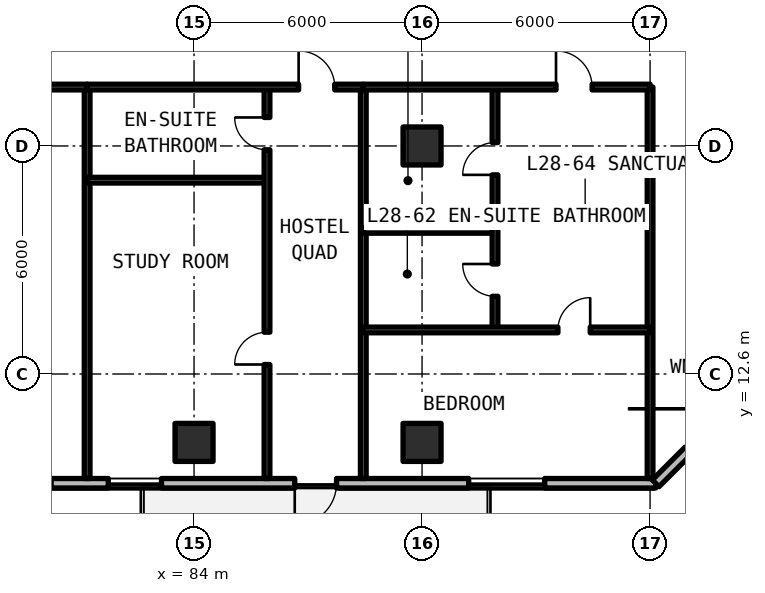
"""IFC4 building model, lengths in metres.
Left out: names, types, materials, properties, quantities, classifications, styles, units other than length and angle.
Written with IfcOpenShell. Run it as: python <this file> out.ifc"""

import sys

from ifc_helpers import new_model, si_unit, direction, frame, frame_2d, origin, origin_2d, place, context, subcontext, project, spatial, rectangle, extrude, element, fill, save


model = new_model("IFC4")
c1 = context("Model", 3, precision=1e-05, world=origin(), true_north=direction((0.0, 1.0)))
c2 = subcontext(c1, "Body", "Model", "MODEL_VIEW")
j1 = project(units=[si_unit("LENGTHUNIT", "METRE"), si_unit("PLANEANGLEUNIT", "RADIAN")], contexts=[c1])
p1 = place(None, origin())
s1 = spatial("IfcSite", under=j1, at=p1, CompositionType="ELEMENT")
p2 = place(p1, origin())
s2 = spatial("IfcBuilding", under=s1, at=p2, CompositionType="ELEMENT")
p3 = place(p2, frame((0.0, 0.0, 101.97)))
s3 = spatial("IfcBuildingStorey", under=s2, at=p3, CompositionType="ELEMENT", Elevation=101.97)
for number, where, z_axis, x_axis in (
    (1, (90.0, 18.6, 0.0), (0.0, 0.0, 1.0), (1.0, 0.0, 0.0)),
    (2, (84.0, 10.8, 0.0), (0.0, 0.0, 1.0), (1.0, 0.0, 0.0)),
    (3, (90.0, 10.8, 0.0), (0.0, 0.0, 1.0), (1.0, 0.0, 0.0)),
):
    element("IfcColumn", number, at=place(p3, frame(where, z_axis=z_axis, x_axis=x_axis)), inside=s3, PredefinedType="COLUMN", context=c2, shape_type="SweptSolid", body=[
        extrude(rectangle(XDim=1.0, YDim=1.0, at=origin_2d()), origin(), (0.0, 0.0, 1.0), 3.3),
    ])
p4 = place(p3, frame((52.125, 9.725, 0.0), z_axis=(0.0, 0.0, 1.0), x_axis=(1.0, 0.0, 0.0)))
e4 = element("IfcWall", 4, at=p4, inside=s3, PredefinedType="SOLIDWALL", context=c2, shape_type="SweptSolid", body=[
    extrude(rectangle(XDim=44.023, YDim=0.25, at=frame_2d((22.012, 0.0))), origin(), (0.0, 0.0, 1.0), 3.08),
])
p5 = place(p4, frame((11.075, 0.0, 0.0)))
e5 = element("IfcOpeningElement", 5, at=p5, cuts=e4, PredefinedType="OPENING", context=c2, shape_type="SweptSolid", body=[
    extrude(rectangle(XDim=1.1, YDim=2.15, at=frame_2d((0.55, 1.075))), frame((0.0, 0.135, 0.0), z_axis=(0.0, -1.0, 0.0), x_axis=(1.0, 0.0, 0.0)), (0.0, 0.0, 1.0), 0.27),
])
p6 = place(p4, frame((22.175, 0.0, 0.0)))
e6 = element("IfcOpeningElement", 6, at=p6, cuts=e4, PredefinedType="OPENING", context=c2, shape_type="SweptSolid", body=[
    extrude(rectangle(XDim=1.1, YDim=2.15, at=frame_2d((0.55, 1.075))), frame((0.0, 0.135, 0.0), z_axis=(0.0, -1.0, 0.0), x_axis=(1.0, 0.0, 0.0)), (0.0, 0.0, 1.0), 0.27),
])
p7 = place(p4, frame((34.525, 0.0, 0.0)))
e7 = element("IfcOpeningElement", 7, at=p7, cuts=e4, PredefinedType="OPENING", context=c2, shape_type="SweptSolid", body=[
    extrude(rectangle(XDim=1.1, YDim=2.15, at=frame_2d((0.55, 1.075))), frame((0.0, 0.135, 0.0), z_axis=(0.0, -1.0, 0.0), x_axis=(1.0, 0.0, 0.0)), (0.0, 0.0, 1.0), 0.27),
])
p8 = place(p4, frame((2.669, 0.0, 0.78)))
e8 = element("IfcOpeningElement", 8, at=p8, cuts=e4, PredefinedType="OPENING", context=c2, shape_type="SweptSolid", body=[
    extrude(rectangle(XDim=2.0, YDim=1.66, at=frame_2d((1.0, 0.83))), frame((0.0, 0.135, 0.0), z_axis=(0.0, -1.0, 0.0), x_axis=(1.0, 0.0, 0.0)), (0.0, 0.0, 1.0), 0.27),
])
p9 = place(p4, frame((8.314, 0.0, 0.78)))
e9 = element("IfcOpeningElement", 9, at=p9, cuts=e4, PredefinedType="OPENING", context=c2, shape_type="SweptSolid", body=[
    extrude(rectangle(XDim=0.85, YDim=1.65, at=frame_2d((0.425, 0.825))), frame((0.0, 0.135, 0.0), z_axis=(0.0, -1.0, 0.0), x_axis=(1.0, 0.0, 0.0)), (0.0, 0.0, 1.0), 0.27),
])
p10 = place(p4, frame((15.009, 0.0, 0.78)))
e10 = element("IfcOpeningElement", 10, at=p10, cuts=e4, PredefinedType="OPENING", context=c2, shape_type="SweptSolid", body=[
    extrude(rectangle(XDim=0.85, YDim=1.65, at=frame_2d((0.425, 0.825))), frame((0.0, 0.135, 0.0), z_axis=(0.0, -1.0, 0.0), x_axis=(1.0, 0.0, 0.0)), (0.0, 0.0, 1.0), 0.27),
])
p11 = place(p4, frame((17.708, 0.0, 0.78)))
e11 = element("IfcOpeningElement", 11, at=p11, cuts=e4, PredefinedType="OPENING", context=c2, shape_type="SweptSolid", body=[
    extrude(rectangle(XDim=1.4, YDim=1.65, at=frame_2d((0.7, 0.825))), frame((0.0, 0.135, 0.0), z_axis=(0.0, -1.0, 0.0), x_axis=(1.0, 0.0, 0.0)), (0.0, 0.0, 1.0), 0.27),
])
p12 = place(p4, frame((26.714, 0.0, 0.78)))
e12 = element("IfcOpeningElement", 12, at=p12, cuts=e4, PredefinedType="OPENING", context=c2, shape_type="SweptSolid", body=[
    extrude(rectangle(XDim=1.4, YDim=1.65, at=frame_2d((0.7, 0.825))), frame((0.0, 0.135, 0.0), z_axis=(0.0, -1.0, 0.0), x_axis=(1.0, 0.0, 0.0)), (0.0, 0.0, 1.0), 0.27),
])
p13 = place(p4, frame((29.618, 0.0, 0.78)))
e13 = element("IfcOpeningElement", 13, at=p13, cuts=e4, PredefinedType="OPENING", context=c2, shape_type="SweptSolid", body=[
    extrude(rectangle(XDim=1.4, YDim=1.65, at=frame_2d((0.7, 0.825))), frame((0.0, 0.135, 0.0), z_axis=(0.0, -1.0, 0.0), x_axis=(1.0, 0.0, 0.0)), (0.0, 0.0, 1.0), 0.27),
])
p14 = place(p4, frame((39.102, 0.0, 0.78)))
e14 = element("IfcOpeningElement", 14, at=p14, cuts=e4, PredefinedType="OPENING", context=c2, shape_type="SweptSolid", body=[
    extrude(rectangle(XDim=2.0, YDim=1.66, at=frame_2d((1.0, 0.83))), frame((0.0, 0.135, 0.0), z_axis=(0.0, -1.0, 0.0), x_axis=(1.0, 0.0, 0.0)), (0.0, 0.0, 1.0), 0.27),
])
p15 = place(p3, frame((96.148, 9.725, 0.0), z_axis=(0.0, 0.0, 1.0), x_axis=(0.707106781187, 0.707106781187, 0.0)))
e15 = element("IfcWall", 15, at=p15, inside=s3, PredefinedType="SOLIDWALL", context=c2, shape_type="SweptSolid", body=[
    extrude(rectangle(XDim=5.836, YDim=0.25, at=frame_2d((2.918, 0.0))), origin(), (0.0, 0.0, 1.0), 3.08),
])
p16 = place(p15, frame((1.218, 0.0, 0.78)))
e16 = element("IfcOpeningElement", 16, at=p16, cuts=e15, PredefinedType="OPENING", context=c2, shape_type="SweptSolid", body=[
    extrude(rectangle(XDim=3.4, YDim=1.66, at=frame_2d((1.7, 0.83))), frame((0.0, 0.135, 0.0), z_axis=(0.0, -1.0, 0.0), x_axis=(1.0, 0.0, 0.0)), (0.0, 0.0, 1.0), 0.27),
])
for number, where, z_axis, x_axis in (
    (17, (96.0, 9.85, 0.0), (0.0, 0.0, 1.0), (0.0, 1.0, 0.0)),
    (18, (81.187, 9.85, 0.0), (0.0, 0.0, 1.0), (0.0, 1.0, 0.0)),
):
    element("IfcWall", number, at=place(p3, frame(where, z_axis=z_axis, x_axis=x_axis)), inside=s3, PredefinedType="SOLIDWALL", context=c2, shape_type="SweptSolid", body=[
        extrude(rectangle(XDim=10.3, YDim=0.15, at=frame_2d((5.15, 0.0))), origin(), (0.0, 0.0, 1.0), 2.35),
    ])
p17 = place(p3, frame((73.641, 20.15, 0.0), z_axis=(0.0, 0.0, 1.0), x_axis=(1.0, 0.0, 0.0)))
e19 = element("IfcWall", 19, at=p17, inside=s3, PredefinedType="SOLIDWALL", context=c2, shape_type="SweptSolid", body=[
    extrude(rectangle(XDim=7.546, YDim=0.15, at=frame_2d((3.773, 0.0))), origin(), (0.0, 0.0, 1.0), 2.35),
])
p18 = place(p17, frame((4.513, 0.0, 0.0)))
e20 = element("IfcOpeningElement", 20, at=p18, cuts=e19, PredefinedType="OPENING", context=c2, shape_type="SweptSolid", body=[
    extrude(rectangle(XDim=0.95, YDim=2.15, at=frame_2d((0.475, 1.075))), frame((0.0, 0.085, 0.0), z_axis=(0.0, -1.0, 0.0), x_axis=(1.0, 0.0, 0.0)), (0.0, 0.0, 1.0), 0.17),
])
p19 = place(p3, frame((88.454, 9.85, 0.0), z_axis=(0.0, 0.0, 1.0), x_axis=(0.0, 1.0, 0.0)))
e21 = element("IfcWall", 21, at=p19, inside=s3, PredefinedType="SOLIDWALL", context=c2, shape_type="SweptSolid", body=[
    extrude(rectangle(XDim=10.3, YDim=0.15, at=frame_2d((5.15, 0.0))), origin(), (0.0, 0.0, 1.0), 2.35),
])
p20 = place(p3, frame((81.187, 17.7, 0.0), z_axis=(0.0, 0.0, 1.0), x_axis=(1.0, 0.0, 0.0)))
e22 = element("IfcWall", 22, at=p20, inside=s3, PredefinedType="PARTITIONING", context=c2, shape_type="SweptSolid", body=[
    extrude(rectangle(XDim=4.733, YDim=0.15, at=frame_2d((2.366, 0.0))), origin(), (0.0, 0.0, 1.0), 2.35),
])
p21 = place(p3, frame((85.92, 9.85, 0.0), z_axis=(0.0, 0.0, 1.0), x_axis=(0.0, 1.0, 0.0)))
e23 = element("IfcWall", 23, at=p21, inside=s3, PredefinedType="PARTITIONING", context=c2, shape_type="SweptSolid", body=[
    extrude(rectangle(XDim=10.3, YDim=0.15, at=frame_2d((5.15, 0.0))), origin(), (0.0, 0.0, 1.0), 2.35),
])
p22 = place(p21, frame((3.0, 0.0, 0.0)))
e24 = element("IfcOpeningElement", 24, at=p22, cuts=e23, PredefinedType="OPENING", context=c2, shape_type="SweptSolid", body=[
    extrude(rectangle(XDim=0.85, YDim=2.1, at=frame_2d((0.425, 1.05))), frame((0.0, 0.085, 0.0), z_axis=(0.0, -1.0, 0.0), x_axis=(1.0, 0.0, 0.0)), (0.0, 0.0, 1.0), 0.17),
])
p23 = place(p21, frame((8.65, 0.0, 0.0)))
e25 = element("IfcOpeningElement", 25, at=p23, cuts=e23, PredefinedType="OPENING", context=c2, shape_type="SweptSolid", body=[
    extrude(rectangle(XDim=0.85, YDim=2.1, at=frame_2d((0.425, 1.05))), frame((0.0, 0.085, 0.0), z_axis=(0.0, -1.0, 0.0), x_axis=(1.0, 0.0, 0.0)), (0.0, 0.0, 1.0), 0.17),
])
p24 = place(p3, frame((81.187, 20.15, 0.0), z_axis=(0.0, 0.0, 1.0), x_axis=(1.0, 0.0, 0.0)))
e26 = element("IfcWall", 26, at=p24, inside=s3, PredefinedType="SOLIDWALL", context=c2, shape_type="SweptSolid", body=[
    extrude(rectangle(XDim=7.267, YDim=0.15, at=frame_2d((3.633, 0.0))), origin(), (0.0, 0.0, 1.0), 2.35),
])
p25 = place(p24, frame((5.565, 0.0, 0.0)))
e27 = element("IfcOpeningElement", 27, at=p25, cuts=e26, PredefinedType="OPENING", context=c2, shape_type="SweptSolid", body=[
    extrude(rectangle(XDim=0.95, YDim=2.15, at=frame_2d((0.475, 1.075))), frame((0.0, 0.085, 0.0), z_axis=(0.0, -1.0, 0.0), x_axis=(1.0, 0.0, 0.0)), (0.0, 0.0, 1.0), 0.17),
])
p26 = place(p3, frame((88.454, 16.379, 0.0), z_axis=(0.0, 0.0, 1.0), x_axis=(1.0, 0.0, 0.0)))
e28 = element("IfcWall", 28, at=p26, inside=s3, PredefinedType="PARTITIONING", context=c2, shape_type="SweptSolid", body=[
    extrude(rectangle(XDim=3.466, YDim=0.15, at=frame_2d((1.733, 0.0))), origin(), (0.0, 0.0, 1.0), 2.35),
])
p27 = place(p3, frame((91.92, 13.759, 0.0), z_axis=(0.0, 0.0, 1.0), x_axis=(0.0, 1.0, 0.0)))
e29 = element("IfcWall", 29, at=p27, inside=s3, PredefinedType="PARTITIONING", context=c2, shape_type="SweptSolid", body=[
    extrude(rectangle(XDim=6.391, YDim=0.15, at=frame_2d((3.195, 0.0))), origin(), (0.0, 0.0, 1.0), 2.35),
])
p28 = place(p27, frame((0.885, 0.0, 0.0)))
e30 = element("IfcOpeningElement", 30, at=p28, cuts=e29, PredefinedType="OPENING", context=c2, shape_type="SweptSolid", body=[
    extrude(rectangle(XDim=0.85, YDim=2.1, at=frame_2d((0.425, 1.05))), frame((0.0, 0.085, 0.0), z_axis=(0.0, -1.0, 0.0), x_axis=(1.0, 0.0, 0.0)), (0.0, 0.0, 1.0), 0.17),
])
p29 = place(p27, frame((4.08, 0.0, 0.0)))
e31 = element("IfcOpeningElement", 31, at=p29, cuts=e29, PredefinedType="OPENING", context=c2, shape_type="SweptSolid", body=[
    extrude(rectangle(XDim=0.85, YDim=2.1, at=frame_2d((0.425, 1.05))), frame((0.0, 0.085, 0.0), z_axis=(0.0, -1.0, 0.0), x_axis=(1.0, 0.0, 0.0)), (0.0, 0.0, 1.0), 0.17),
])
p30 = place(p3, frame((88.454, 13.759, 0.0), z_axis=(0.0, 0.0, 1.0), x_axis=(1.0, 0.0, 0.0)))
e32 = element("IfcWall", 32, at=p30, inside=s3, PredefinedType="PARTITIONING", context=c2, shape_type="SweptSolid", body=[
    extrude(rectangle(XDim=7.546, YDim=0.15, at=frame_2d((3.773, 0.0))), origin(), (0.0, 0.0, 1.0), 2.35),
])
p31 = place(p30, frame((5.121, 0.0, 0.0)))
e33 = element("IfcOpeningElement", 33, at=p31, cuts=e32, PredefinedType="OPENING", context=c2, shape_type="SweptSolid", body=[
    extrude(rectangle(XDim=0.85, YDim=2.1, at=frame_2d((0.425, 1.05))), frame((0.0, 0.085, 0.0), z_axis=(0.0, -1.0, 0.0), x_axis=(1.0, 0.0, 0.0)), (0.0, 0.0, 1.0), 0.17),
])
p32 = place(p3, frame((88.454, 20.15, 0.0), z_axis=(0.0, 0.0, 1.0), x_axis=(1.0, 0.0, 0.0)))
e34 = element("IfcWall", 34, at=p32, inside=s3, PredefinedType="SOLIDWALL", context=c2, shape_type="SweptSolid", body=[
    extrude(rectangle(XDim=7.546, YDim=0.15, at=frame_2d((3.773, 0.0))), origin(), (0.0, 0.0, 1.0), 2.35),
])
p33 = place(p32, frame((5.071, 0.0, 0.0)))
e35 = element("IfcOpeningElement", 35, at=p33, cuts=e34, PredefinedType="OPENING", context=c2, shape_type="SweptSolid", body=[
    extrude(rectangle(XDim=0.95, YDim=2.15, at=frame_2d((0.475, 1.075))), frame((0.0, 0.085, 0.0), z_axis=(0.0, -1.0, 0.0), x_axis=(1.0, 0.0, 0.0)), (0.0, 0.0, 1.0), 0.17),
])
p34 = place(p7, frame((1.1, 0.0, 0.0), z_axis=(0.0, 0.0, 1.0), x_axis=(-1.0, 0.0, 0.0)))
e36 = element("IfcDoor", 36, at=p34, inside=s3, OperationType="SINGLE_SWING_LEFT", PredefinedType="DOOR", context=c2, shape_type="SweptSolid", body=[
    extrude(rectangle(XDim=1.1, YDim=2.15, at=frame_2d((0.55, 1.075))), frame((0.0, 0.025, 0.0), z_axis=(0.0, -1.0, 0.0), x_axis=(1.0, 0.0, 0.0)), (0.0, 0.0, 1.0), 0.05),
])
fill(e7, e36)
p35 = place(p13, origin())
e37 = element("IfcWindow", 37, at=p35, inside=s3, PartitioningType="SINGLE_PANEL", PredefinedType="WINDOW", context=c2, shape_type="SweptSolid", body=[
    extrude(rectangle(XDim=1.4, YDim=1.65, at=frame_2d((0.7, 0.825))), frame((0.0, 0.03, 0.0), z_axis=(0.0, -1.0, 0.0), x_axis=(1.0, 0.0, 0.0)), (0.0, 0.0, 1.0), 0.06),
])
fill(e13, e37)
p36 = place(p14, origin())
e38 = element("IfcWindow", 38, at=p36, inside=s3, PartitioningType="SINGLE_PANEL", PredefinedType="WINDOW", context=c2, shape_type="SweptSolid", body=[
    extrude(rectangle(XDim=2.0, YDim=1.66, at=frame_2d((1.0, 0.83))), frame((0.0, 0.03, 0.0), z_axis=(0.0, -1.0, 0.0), x_axis=(1.0, 0.0, 0.0)), (0.0, 0.0, 1.0), 0.06),
])
fill(e14, e38)
p37 = place(p22, origin())
e39 = element("IfcDoor", 39, at=p37, inside=s3, OperationType="SINGLE_SWING_LEFT", PredefinedType="DOOR", context=c2, shape_type="SweptSolid", body=[
    extrude(rectangle(XDim=0.85, YDim=2.1, at=frame_2d((0.425, 1.05))), frame((0.0, 0.025, 0.0), z_axis=(0.0, -1.0, 0.0), x_axis=(1.0, 0.0, 0.0)), (0.0, 0.0, 1.0), 0.05),
])
fill(e24, e39)
p38 = place(p23, origin())
e40 = element("IfcDoor", 40, at=p38, inside=s3, OperationType="SINGLE_SWING_RIGHT", PredefinedType="DOOR", context=c2, shape_type="SweptSolid", body=[
    extrude(rectangle(XDim=0.85, YDim=2.1, at=frame_2d((0.425, 1.05))), frame((0.0, 0.025, 0.0), z_axis=(0.0, -1.0, 0.0), x_axis=(1.0, 0.0, 0.0)), (0.0, 0.0, 1.0), 0.05),
])
fill(e25, e40)
p39 = place(p25, origin())
e41 = element("IfcDoor", 41, at=p39, inside=s3, OperationType="SINGLE_SWING_LEFT", PredefinedType="DOOR", context=c2, shape_type="SweptSolid", body=[
    extrude(rectangle(XDim=0.95, YDim=2.15, at=frame_2d((0.475, 1.075))), frame((0.0, 0.025, 0.0), z_axis=(0.0, -1.0, 0.0), x_axis=(1.0, 0.0, 0.0)), (0.0, 0.0, 1.0), 0.05),
])
fill(e27, e41)
p40 = place(p28, origin())
e42 = element("IfcDoor", 42, at=p40, inside=s3, OperationType="SINGLE_SWING_RIGHT", PredefinedType="DOOR", context=c2, shape_type="SweptSolid", body=[
    extrude(rectangle(XDim=0.85, YDim=2.1, at=frame_2d((0.425, 1.05))), frame((0.0, 0.025, 0.0), z_axis=(0.0, -1.0, 0.0), x_axis=(1.0, 0.0, 0.0)), (0.0, 0.0, 1.0), 0.05),
])
fill(e30, e42)
p41 = place(p29, origin())
e43 = element("IfcDoor", 43, at=p41, inside=s3, OperationType="SINGLE_SWING_LEFT", PredefinedType="DOOR", context=c2, shape_type="SweptSolid", body=[
    extrude(rectangle(XDim=0.85, YDim=2.1, at=frame_2d((0.425, 1.05))), frame((0.0, 0.025, 0.0), z_axis=(0.0, -1.0, 0.0), x_axis=(1.0, 0.0, 0.0)), (0.0, 0.0, 1.0), 0.05),
])
fill(e31, e43)
p42 = place(p31, origin())
e44 = element("IfcDoor", 44, at=p42, inside=s3, OperationType="SINGLE_SWING_RIGHT", PredefinedType="DOOR", context=c2, shape_type="SweptSolid", body=[
    extrude(rectangle(XDim=0.85, YDim=2.1, at=frame_2d((0.425, 1.05))), frame((0.0, 0.025, 0.0), z_axis=(0.0, -1.0, 0.0), x_axis=(1.0, 0.0, 0.0)), (0.0, 0.0, 1.0), 0.05),
])
fill(e33, e44)
p43 = place(p33, origin())
e45 = element("IfcDoor", 45, at=p43, inside=s3, OperationType="SINGLE_SWING_LEFT", PredefinedType="DOOR", context=c2, shape_type="SweptSolid", body=[
    extrude(rectangle(XDim=0.95, YDim=2.15, at=frame_2d((0.475, 1.075))), frame((0.0, 0.025, 0.0), z_axis=(0.0, -1.0, 0.0), x_axis=(1.0, 0.0, 0.0)), (0.0, 0.0, 1.0), 0.05),
])
fill(e35, e45)
save(model, sys.argv[1])
